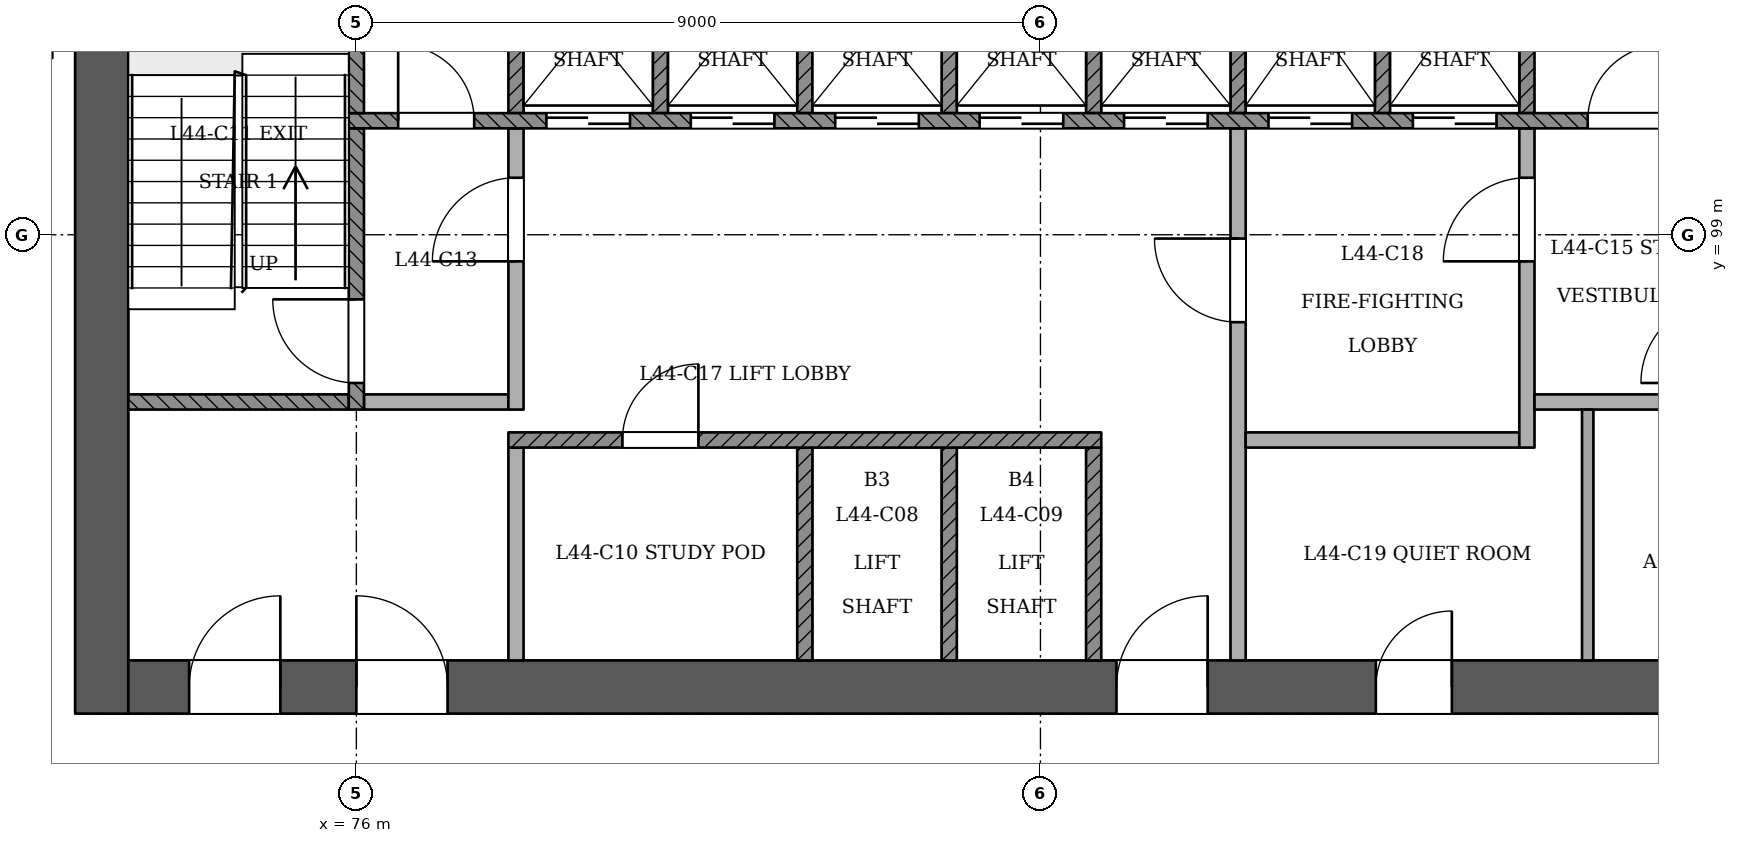
"""IFC4 building model, lengths in metres.
Left out: names, types, materials, properties, quantities, classifications, styles, units other than length and angle.
Written with IfcOpenShell. Run it as: python <this file> out.ifc"""

import sys

from ifc_helpers import new_model, si_unit, direction, frame, frame_2d, origin, place, context, subcontext, project, spatial, rectangle, extrude, element, fill, save


model = new_model("IFC4")
c1 = context("Model", 3, precision=1e-05, world=origin(), true_north=direction((0.0, 1.0)))
c2 = subcontext(c1, "Body", "Model", "MODEL_VIEW")
j1 = project(units=[si_unit("LENGTHUNIT", "METRE"), si_unit("PLANEANGLEUNIT", "RADIAN")], contexts=[c1])
p1 = place(None, origin())
s1 = spatial("IfcSite", under=j1, at=p1, CompositionType="ELEMENT")
p2 = place(p1, origin())
s2 = spatial("IfcBuilding", under=s1, at=p2, CompositionType="ELEMENT")
p3 = place(p2, frame((0.0, 0.0, 171.0)))
s3 = spatial("IfcBuildingStorey", under=s2, at=p3, CompositionType="ELEMENT", Elevation=171.0)
p4 = place(p3, frame((72.65, 93.05, 0.0), z_axis=(0.0, 0.0, 1.0), x_axis=(1.0, 0.0, 0.0)))
e1 = element("IfcWall", 1, at=p4, inside=s3, PredefinedType="SHEAR", context=c2, shape_type="SweptSolid", body=[
    extrude(rectangle(XDim=25.05, YDim=0.7, at=frame_2d((12.525, 0.0))), origin(), (0.0, 0.0, 1.0), 3.6),
])
p5 = place(p4, frame((1.15, 0.0, 0.0)))
e2 = element("IfcOpeningElement", 2, at=p5, cuts=e1, PredefinedType="OPENING", context=c2, shape_type="SweptSolid", body=[
    extrude(rectangle(XDim=1.2, YDim=2.1, at=frame_2d((0.6, 1.05))), frame((0.0, 0.36, 0.0), z_axis=(0.0, -1.0, 0.0), x_axis=(1.0, 0.0, 0.0)), (0.0, 0.0, 1.0), 0.721),
])
p6 = place(p4, frame((3.35, 0.0, 0.0)))
e3 = element("IfcOpeningElement", 3, at=p6, cuts=e1, PredefinedType="OPENING", context=c2, shape_type="SweptSolid", body=[
    extrude(rectangle(XDim=1.2, YDim=2.1, at=frame_2d((0.6, 1.05))), frame((0.0, 0.36, 0.0), z_axis=(0.0, -1.0, 0.0), x_axis=(1.0, 0.0, 0.0)), (0.0, 0.0, 1.0), 0.721),
])
p7 = place(p4, frame((13.35, 0.0, 0.0)))
e4 = element("IfcOpeningElement", 4, at=p7, cuts=e1, PredefinedType="OPENING", context=c2, shape_type="SweptSolid", body=[
    extrude(rectangle(XDim=1.2, YDim=2.1, at=frame_2d((0.6, 1.05))), frame((0.0, 0.36, 0.0), z_axis=(0.0, -1.0, 0.0), x_axis=(1.0, 0.0, 0.0)), (0.0, 0.0, 1.0), 0.721),
])
p8 = place(p4, frame((16.762, 0.0, 0.0)))
e5 = element("IfcOpeningElement", 5, at=p8, cuts=e1, PredefinedType="OPENING", context=c2, shape_type="SweptSolid", body=[
    extrude(rectangle(XDim=1.0, YDim=2.1, at=frame_2d((0.5, 1.05))), frame((0.0, 0.36, 0.0), z_axis=(0.0, -1.0, 0.0), x_axis=(1.0, 0.0, 0.0)), (0.0, 0.0, 1.0), 0.721),
])
p9 = place(p4, frame((20.65, 0.0, 0.0)))
e6 = element("IfcOpeningElement", 6, at=p9, cuts=e1, PredefinedType="OPENING", context=c2, shape_type="SweptSolid", body=[
    extrude(rectangle(XDim=1.0, YDim=2.1, at=frame_2d((0.5, 1.05))), frame((0.0, 0.36, 0.0), z_axis=(0.0, -1.0, 0.0), x_axis=(1.0, 0.0, 0.0)), (0.0, 0.0, 1.0), 0.721),
])
p10 = place(p4, frame((23.087, 0.0, 0.0)))
e7 = element("IfcOpeningElement", 7, at=p10, cuts=e1, PredefinedType="OPENING", context=c2, shape_type="SweptSolid", body=[
    extrude(rectangle(XDim=1.0, YDim=2.1, at=frame_2d((0.5, 1.05))), frame((0.0, 0.36, 0.0), z_axis=(0.0, -1.0, 0.0), x_axis=(1.0, 0.0, 0.0)), (0.0, 0.0, 1.0), 0.721),
])
p11 = place(p3, frame((72.65, 103.75, 0.0), z_axis=(0.0, 0.0, 1.0), x_axis=(0.0, -1.0, 0.0)))
e8 = element("IfcWall", 8, at=p11, inside=s3, PredefinedType="SHEAR", context=c2, shape_type="SweptSolid", body=[
    extrude(rectangle(XDim=11.05, YDim=0.7, at=frame_2d((5.525, 0.0))), origin(), (0.0, 0.0, 1.0), 3.6),
])
p12 = place(p3, frame((78.1, 93.4, 0.0), z_axis=(0.0, 0.0, 1.0), x_axis=(0.0, 1.0, 0.0)))
e9 = element("IfcWall", 9, at=p12, inside=s3, PredefinedType="PARTITIONING", context=c2, shape_type="SweptSolid", body=[
    extrude(rectangle(XDim=2.8, YDim=0.2, at=frame_2d((1.4, 0.0))), origin(), (0.0, 0.0, 1.0), 3.15),
])
for number, where, z_axis, x_axis in (
    (10, (81.9, 93.4, 0.0), (0.0, 0.0, 1.0), (0.0, 1.0, 0.0)),
    (11, (83.8, 93.4, 0.0), (0.0, 0.0, 1.0), (0.0, 1.0, 0.0)),
    (12, (85.7, 93.4, 0.0), (0.0, 0.0, 1.0), (0.0, 1.0, 0.0)),
):
    element("IfcWall", number, at=place(p3, frame(where, z_axis=z_axis, x_axis=x_axis)), inside=s3, PredefinedType="SOLIDWALL", context=c2, shape_type="SweptSolid", body=[
        extrude(rectangle(XDim=2.8, YDim=0.2, at=frame_2d((1.4, 0.0))), origin(), (0.0, 0.0, 1.0), 3.15),
    ])
p13 = place(p3, frame((87.6, 93.4, 0.0), z_axis=(0.0, 0.0, 1.0), x_axis=(0.0, 1.0, 0.0)))
e13 = element("IfcWall", 13, at=p13, inside=s3, PredefinedType="PARTITIONING", context=c2, shape_type="SweptSolid", body=[
    extrude(rectangle(XDim=7.0, YDim=0.2, at=frame_2d((3.5, 0.0))), origin(), (0.0, 0.0, 1.0), 3.15),
])
p14 = place(p13, frame((4.45, 0.0, 0.0)))
e14 = element("IfcOpeningElement", 14, at=p14, cuts=e13, PredefinedType="OPENING", context=c2, shape_type="SweptSolid", body=[
    extrude(rectangle(XDim=1.1, YDim=2.1, at=frame_2d((0.55, 1.05))), frame((0.0, 0.11, 0.0), z_axis=(0.0, -1.0, 0.0), x_axis=(1.0, 0.0, 0.0)), (0.0, 0.0, 1.0), 0.221),
])
p15 = place(p3, frame((92.2, 93.4, 0.0), z_axis=(0.0, 0.0, 1.0), x_axis=(0.0, 1.0, 0.0)))
e15 = element("IfcWall", 15, at=p15, inside=s3, PredefinedType="PARTITIONING", context=c2, shape_type="SweptSolid", body=[
    extrude(rectangle(XDim=3.3, YDim=0.15, at=frame_2d((1.65, 0.0))), origin(), (0.0, 0.0, 1.0), 3.15),
])
p16 = place(p3, frame((78.0, 96.3, 0.0), z_axis=(0.0, 0.0, 1.0), x_axis=(1.0, 0.0, 0.0)))
e16 = element("IfcWall", 16, at=p16, inside=s3, PredefinedType="SOLIDWALL", context=c2, shape_type="SweptSolid", body=[
    extrude(rectangle(XDim=7.8, YDim=0.2, at=frame_2d((3.9, 0.0))), origin(), (0.0, 0.0, 1.0), 3.15),
])
p17 = place(p16, frame((1.5, 0.0, 0.0)))
e17 = element("IfcOpeningElement", 17, at=p17, cuts=e16, PredefinedType="OPENING", context=c2, shape_type="SweptSolid", body=[
    extrude(rectangle(XDim=1.0, YDim=2.1, at=frame_2d((0.5, 1.05))), frame((0.0, 0.11, 0.0), z_axis=(0.0, -1.0, 0.0), x_axis=(1.0, 0.0, 0.0)), (0.0, 0.0, 1.0), 0.221),
])
p18 = place(p3, frame((87.7, 96.3, 0.0), z_axis=(0.0, 0.0, 1.0), x_axis=(1.0, 0.0, 0.0)))
e18 = element("IfcWall", 18, at=p18, inside=s3, PredefinedType="PARTITIONING", context=c2, shape_type="SweptSolid", body=[
    extrude(rectangle(XDim=3.6, YDim=0.2, at=frame_2d((1.8, 0.0))), origin(), (0.0, 0.0, 1.0), 3.15),
])
p19 = place(p3, frame((91.4, 96.2, 0.0), z_axis=(0.0, 0.0, 1.0), x_axis=(0.0, 1.0, 0.0)))
e19 = element("IfcWall", 19, at=p19, inside=s3, PredefinedType="PARTITIONING", context=c2, shape_type="SweptSolid", body=[
    extrude(rectangle(XDim=4.2, YDim=0.2, at=frame_2d((2.1, 0.0))), origin(), (0.0, 0.0, 1.0), 3.15),
])
p20 = place(p19, frame((2.45, 0.0, 0.0)))
e20 = element("IfcOpeningElement", 20, at=p20, cuts=e19, PredefinedType="OPENING", context=c2, shape_type="SweptSolid", body=[
    extrude(rectangle(XDim=1.1, YDim=2.1, at=frame_2d((0.55, 1.05))), frame((0.0, 0.11, 0.0), z_axis=(0.0, -1.0, 0.0), x_axis=(1.0, 0.0, 0.0)), (0.0, 0.0, 1.0), 0.221),
])
p21 = place(p3, frame((73.0, 96.8, 0.0), z_axis=(0.0, 0.0, 1.0), x_axis=(1.0, 0.0, 0.0)))
e21 = element("IfcWall", 21, at=p21, inside=s3, PredefinedType="SOLIDWALL", context=c2, shape_type="SweptSolid", body=[
    extrude(rectangle(XDim=2.9, YDim=0.2, at=frame_2d((1.45, 0.0))), origin(), (0.0, 0.0, 1.0), 3.15),
])
p22 = place(p3, frame((76.0, 96.7, 0.0), z_axis=(0.0, 0.0, 1.0), x_axis=(0.0, 1.0, 0.0)))
e22 = element("IfcWall", 22, at=p22, inside=s3, PredefinedType="SOLIDWALL", context=c2, shape_type="SweptSolid", body=[
    extrude(rectangle(XDim=3.7, YDim=0.2, at=frame_2d((1.85, 0.0))), origin(), (0.0, 0.0, 1.0), 3.15),
])
p23 = place(p22, frame((0.35, 0.0, 0.0)))
e23 = element("IfcOpeningElement", 23, at=p23, cuts=e22, PredefinedType="OPENING", context=c2, shape_type="SweptSolid", body=[
    extrude(rectangle(XDim=1.1, YDim=2.1, at=frame_2d((0.55, 1.05))), frame((0.0, 0.11, 0.0), z_axis=(0.0, -1.0, 0.0), x_axis=(1.0, 0.0, 0.0)), (0.0, 0.0, 1.0), 0.221),
])
p24 = place(p3, frame((76.1, 96.8, 0.0), z_axis=(0.0, 0.0, 1.0), x_axis=(1.0, 0.0, 0.0)))
e24 = element("IfcWall", 24, at=p24, inside=s3, PredefinedType="PARTITIONING", context=c2, shape_type="SweptSolid", body=[
    extrude(rectangle(XDim=1.9, YDim=0.2, at=frame_2d((0.95, 0.0))), origin(), (0.0, 0.0, 1.0), 3.15),
])
p25 = place(p3, frame((78.1, 96.7, 0.0), z_axis=(0.0, 0.0, 1.0), x_axis=(0.0, 1.0, 0.0)))
e25 = element("IfcWall", 25, at=p25, inside=s3, PredefinedType="PARTITIONING", context=c2, shape_type="SweptSolid", body=[
    extrude(rectangle(XDim=3.7, YDim=0.2, at=frame_2d((1.85, 0.0))), origin(), (0.0, 0.0, 1.0), 3.15),
])
p26 = place(p25, frame((1.95, 0.0, 0.0)))
e26 = element("IfcOpeningElement", 26, at=p26, cuts=e25, PredefinedType="OPENING", context=c2, shape_type="SweptSolid", body=[
    extrude(rectangle(XDim=1.1, YDim=2.1, at=frame_2d((0.55, 1.05))), frame((0.0, 0.11, 0.0), z_axis=(0.0, -1.0, 0.0), x_axis=(1.0, 0.0, 0.0)), (0.0, 0.0, 1.0), 0.221),
])
p27 = place(p3, frame((91.5, 96.8, 0.0), z_axis=(0.0, 0.0, 1.0), x_axis=(1.0, 0.0, 0.0)))
e27 = element("IfcWall", 27, at=p27, inside=s3, PredefinedType="PARTITIONING", context=c2, shape_type="SweptSolid", body=[
    extrude(rectangle(XDim=2.4, YDim=0.2, at=frame_2d((1.2, 0.0))), origin(), (0.0, 0.0, 1.0), 3.15),
])
p28 = place(p3, frame((75.9, 100.5, 0.0), z_axis=(0.0, 0.0, 1.0), x_axis=(1.0, 0.0, 0.0)))
e28 = element("IfcWall", 28, at=p28, inside=s3, PredefinedType="SOLIDWALL", context=c2, shape_type="SweptSolid", body=[
    extrude(rectangle(XDim=18.2, YDim=0.2, at=frame_2d((9.1, 0.0))), origin(), (0.0, 0.0, 1.0), 3.15),
])
p29 = place(p28, frame((2.6, 0.0, 0.0)))
e29 = element("IfcOpeningElement", 29, at=p29, cuts=e28, PredefinedType="OPENING", context=c2, shape_type="SweptSolid", body=[
    extrude(rectangle(XDim=1.1, YDim=2.1, at=frame_2d((0.55, 1.05))), frame((0.0, 0.11, 0.0), z_axis=(0.0, -1.0, 0.0), x_axis=(1.0, 0.0, 0.0)), (0.0, 0.0, 1.0), 0.221),
])
p30 = place(p28, frame((4.5, 0.0, 0.0)))
e30 = element("IfcOpeningElement", 30, at=p30, cuts=e28, PredefinedType="OPENING", context=c2, shape_type="SweptSolid", body=[
    extrude(rectangle(XDim=1.1, YDim=2.1, at=frame_2d((0.55, 1.05))), frame((0.0, 0.11, 0.0), z_axis=(0.0, -1.0, 0.0), x_axis=(1.0, 0.0, 0.0)), (0.0, 0.0, 1.0), 0.221),
])
p31 = place(p28, frame((6.4, 0.0, 0.0)))
e31 = element("IfcOpeningElement", 31, at=p31, cuts=e28, PredefinedType="OPENING", context=c2, shape_type="SweptSolid", body=[
    extrude(rectangle(XDim=1.1, YDim=2.1, at=frame_2d((0.55, 1.05))), frame((0.0, 0.11, 0.0), z_axis=(0.0, -1.0, 0.0), x_axis=(1.0, 0.0, 0.0)), (0.0, 0.0, 1.0), 0.221),
])
p32 = place(p28, frame((8.3, 0.0, 0.0)))
e32 = element("IfcOpeningElement", 32, at=p32, cuts=e28, PredefinedType="OPENING", context=c2, shape_type="SweptSolid", body=[
    extrude(rectangle(XDim=1.1, YDim=2.1, at=frame_2d((0.55, 1.05))), frame((0.0, 0.11, 0.0), z_axis=(0.0, -1.0, 0.0), x_axis=(1.0, 0.0, 0.0)), (0.0, 0.0, 1.0), 0.221),
])
p33 = place(p28, frame((10.2, 0.0, 0.0)))
e33 = element("IfcOpeningElement", 33, at=p33, cuts=e28, PredefinedType="OPENING", context=c2, shape_type="SweptSolid", body=[
    extrude(rectangle(XDim=1.1, YDim=2.1, at=frame_2d((0.55, 1.05))), frame((0.0, 0.11, 0.0), z_axis=(0.0, -1.0, 0.0), x_axis=(1.0, 0.0, 0.0)), (0.0, 0.0, 1.0), 0.221),
])
p34 = place(p28, frame((12.1, 0.0, 0.0)))
e34 = element("IfcOpeningElement", 34, at=p34, cuts=e28, PredefinedType="OPENING", context=c2, shape_type="SweptSolid", body=[
    extrude(rectangle(XDim=1.1, YDim=2.1, at=frame_2d((0.55, 1.05))), frame((0.0, 0.11, 0.0), z_axis=(0.0, -1.0, 0.0), x_axis=(1.0, 0.0, 0.0)), (0.0, 0.0, 1.0), 0.221),
])
p35 = place(p28, frame((14.0, 0.0, 0.0)))
e35 = element("IfcOpeningElement", 35, at=p35, cuts=e28, PredefinedType="OPENING", context=c2, shape_type="SweptSolid", body=[
    extrude(rectangle(XDim=1.1, YDim=2.1, at=frame_2d((0.55, 1.05))), frame((0.0, 0.11, 0.0), z_axis=(0.0, -1.0, 0.0), x_axis=(1.0, 0.0, 0.0)), (0.0, 0.0, 1.0), 0.221),
])
p36 = place(p28, frame((0.65, 0.0, 0.0)))
e36 = element("IfcOpeningElement", 36, at=p36, cuts=e28, PredefinedType="OPENING", context=c2, shape_type="SweptSolid", body=[
    extrude(rectangle(XDim=1.0, YDim=2.1, at=frame_2d((0.5, 1.05))), frame((0.0, 0.11, 0.0), z_axis=(0.0, -1.0, 0.0), x_axis=(1.0, 0.0, 0.0)), (0.0, 0.0, 1.0), 0.221),
])
p37 = place(p28, frame((16.3, 0.0, 0.0)))
e37 = element("IfcOpeningElement", 37, at=p37, cuts=e28, PredefinedType="OPENING", context=c2, shape_type="SweptSolid", body=[
    extrude(rectangle(XDim=1.0, YDim=2.1, at=frame_2d((0.5, 1.05))), frame((0.0, 0.11, 0.0), z_axis=(0.0, -1.0, 0.0), x_axis=(1.0, 0.0, 0.0)), (0.0, 0.0, 1.0), 0.221),
])
for number, where, z_axis, x_axis in (
    (38, (76.0, 100.6, 0.0), (0.0, 0.0, 1.0), (0.0, 1.0, 0.0)),
    (39, (78.1, 100.6, 0.0), (0.0, 0.0, 1.0), (0.0, 1.0, 0.0)),
    (40, (80.0, 100.6, 0.0), (0.0, 0.0, 1.0), (0.0, 1.0, 0.0)),
    (41, (81.9, 100.6, 0.0), (0.0, 0.0, 1.0), (0.0, 1.0, 0.0)),
    (42, (83.8, 100.6, 0.0), (0.0, 0.0, 1.0), (0.0, 1.0, 0.0)),
    (43, (85.7, 100.6, 0.0), (0.0, 0.0, 1.0), (0.0, 1.0, 0.0)),
    (44, (87.6, 100.6, 0.0), (0.0, 0.0, 1.0), (0.0, 1.0, 0.0)),
    (45, (89.5, 100.6, 0.0), (0.0, 0.0, 1.0), (0.0, 1.0, 0.0)),
    (46, (91.4, 100.6, 0.0), (0.0, 0.0, 1.0), (0.0, 1.0, 0.0)),
):
    element("IfcWall", number, at=place(p3, frame(where, z_axis=z_axis, x_axis=x_axis)), inside=s3, PredefinedType="SOLIDWALL", context=c2, shape_type="SweptSolid", body=[
        extrude(rectangle(XDim=2.8, YDim=0.2, at=frame_2d((1.4, 0.0))), origin(), (0.0, 0.0, 1.0), 3.15),
    ])
p38 = place(p29, origin())
e47 = element("IfcDoor", 47, at=p38, inside=s3, OperationType="SLIDING_TO_RIGHT", PredefinedType="NOTDEFINED", context=c2, shape_type="SweptSolid", body=[
    extrude(rectangle(XDim=1.1, YDim=2.1, at=frame_2d((0.55, 1.05))), frame((0.0, 0.025, 0.0), z_axis=(0.0, -1.0, 0.0), x_axis=(1.0, 0.0, 0.0)), (0.0, 0.0, 1.0), 0.05),
])
fill(e29, e47)
p39 = place(p30, origin())
e48 = element("IfcDoor", 48, at=p39, inside=s3, OperationType="SLIDING_TO_LEFT", PredefinedType="NOTDEFINED", context=c2, shape_type="SweptSolid", body=[
    extrude(rectangle(XDim=1.1, YDim=2.1, at=frame_2d((0.55, 1.05))), frame((0.0, 0.025, 0.0), z_axis=(0.0, -1.0, 0.0), x_axis=(1.0, 0.0, 0.0)), (0.0, 0.0, 1.0), 0.05),
])
fill(e30, e48)
p40 = place(p31, origin())
e49 = element("IfcDoor", 49, at=p40, inside=s3, OperationType="SLIDING_TO_RIGHT", PredefinedType="NOTDEFINED", context=c2, shape_type="SweptSolid", body=[
    extrude(rectangle(XDim=1.1, YDim=2.1, at=frame_2d((0.55, 1.05))), frame((0.0, 0.025, 0.0), z_axis=(0.0, -1.0, 0.0), x_axis=(1.0, 0.0, 0.0)), (0.0, 0.0, 1.0), 0.05),
])
fill(e31, e49)
p41 = place(p32, origin())
e50 = element("IfcDoor", 50, at=p41, inside=s3, OperationType="SLIDING_TO_LEFT", PredefinedType="NOTDEFINED", context=c2, shape_type="SweptSolid", body=[
    extrude(rectangle(XDim=1.1, YDim=2.1, at=frame_2d((0.55, 1.05))), frame((0.0, 0.025, 0.0), z_axis=(0.0, -1.0, 0.0), x_axis=(1.0, 0.0, 0.0)), (0.0, 0.0, 1.0), 0.05),
])
fill(e32, e50)
p42 = place(p33, origin())
e51 = element("IfcDoor", 51, at=p42, inside=s3, OperationType="SLIDING_TO_RIGHT", PredefinedType="NOTDEFINED", context=c2, shape_type="SweptSolid", body=[
    extrude(rectangle(XDim=1.1, YDim=2.1, at=frame_2d((0.55, 1.05))), frame((0.0, 0.025, 0.0), z_axis=(0.0, -1.0, 0.0), x_axis=(1.0, 0.0, 0.0)), (0.0, 0.0, 1.0), 0.05),
])
fill(e33, e51)
p43 = place(p34, origin())
e52 = element("IfcDoor", 52, at=p43, inside=s3, OperationType="SLIDING_TO_RIGHT", PredefinedType="NOTDEFINED", context=c2, shape_type="SweptSolid", body=[
    extrude(rectangle(XDim=1.1, YDim=2.1, at=frame_2d((0.55, 1.05))), frame((0.0, 0.025, 0.0), z_axis=(0.0, -1.0, 0.0), x_axis=(1.0, 0.0, 0.0)), (0.0, 0.0, 1.0), 0.05),
])
fill(e34, e52)
p44 = place(p35, origin())
e53 = element("IfcDoor", 53, at=p44, inside=s3, OperationType="SLIDING_TO_LEFT", PredefinedType="NOTDEFINED", context=c2, shape_type="SweptSolid", body=[
    extrude(rectangle(XDim=1.1, YDim=2.1, at=frame_2d((0.55, 1.05))), frame((0.0, 0.025, 0.0), z_axis=(0.0, -1.0, 0.0), x_axis=(1.0, 0.0, 0.0)), (0.0, 0.0, 1.0), 0.05),
])
fill(e35, e53)
p45 = place(p23, origin())
e54 = element("IfcDoor", 54, at=p45, inside=s3, OperationType="SINGLE_SWING_RIGHT", PredefinedType="NOTDEFINED", context=c2, shape_type="SweptSolid", body=[
    extrude(rectangle(XDim=1.1, YDim=2.1, at=frame_2d((0.55, 1.05))), frame((0.0, 0.025, 0.0), z_axis=(0.0, -1.0, 0.0), x_axis=(1.0, 0.0, 0.0)), (0.0, 0.0, 1.0), 0.05),
])
fill(e23, e54)
p46 = place(p26, origin())
e55 = element("IfcDoor", 55, at=p46, inside=s3, OperationType="SINGLE_SWING_LEFT", PredefinedType="NOTDEFINED", context=c2, shape_type="SweptSolid", body=[
    extrude(rectangle(XDim=1.1, YDim=2.1, at=frame_2d((0.55, 1.05))), frame((0.0, 0.025, 0.0), z_axis=(0.0, -1.0, 0.0), x_axis=(1.0, 0.0, 0.0)), (0.0, 0.0, 1.0), 0.05),
])
fill(e26, e55)
p47 = place(p14, origin())
e56 = element("IfcDoor", 56, at=p47, inside=s3, OperationType="SINGLE_SWING_RIGHT", PredefinedType="NOTDEFINED", context=c2, shape_type="SweptSolid", body=[
    extrude(rectangle(XDim=1.1, YDim=2.1, at=frame_2d((0.55, 1.05))), frame((0.0, 0.025, 0.0), z_axis=(0.0, -1.0, 0.0), x_axis=(1.0, 0.0, 0.0)), (0.0, 0.0, 1.0), 0.05),
])
fill(e14, e56)
p48 = place(p20, origin())
e57 = element("IfcDoor", 57, at=p48, inside=s3, OperationType="SINGLE_SWING_LEFT", PredefinedType="NOTDEFINED", context=c2, shape_type="SweptSolid", body=[
    extrude(rectangle(XDim=1.1, YDim=2.1, at=frame_2d((0.55, 1.05))), frame((0.0, 0.025, 0.0), z_axis=(0.0, -1.0, 0.0), x_axis=(1.0, 0.0, 0.0)), (0.0, 0.0, 1.0), 0.05),
])
fill(e20, e57)
p49 = place(p5, origin())
e58 = element("IfcDoor", 58, at=p49, inside=s3, OperationType="SINGLE_SWING_RIGHT", PredefinedType="NOTDEFINED", context=c2, shape_type="SweptSolid", body=[
    extrude(rectangle(XDim=1.2, YDim=2.1, at=frame_2d((0.6, 1.05))), frame((0.0, 0.025, 0.0), z_axis=(0.0, -1.0, 0.0), x_axis=(1.0, 0.0, 0.0)), (0.0, 0.0, 1.0), 0.05),
])
fill(e2, e58)
p50 = place(p6, origin())
e59 = element("IfcDoor", 59, at=p50, inside=s3, OperationType="SINGLE_SWING_LEFT", PredefinedType="NOTDEFINED", context=c2, shape_type="SweptSolid", body=[
    extrude(rectangle(XDim=1.2, YDim=2.1, at=frame_2d((0.6, 1.05))), frame((0.0, 0.025, 0.0), z_axis=(0.0, -1.0, 0.0), x_axis=(1.0, 0.0, 0.0)), (0.0, 0.0, 1.0), 0.05),
])
fill(e3, e59)
p51 = place(p7, origin())
e60 = element("IfcDoor", 60, at=p51, inside=s3, OperationType="SINGLE_SWING_RIGHT", PredefinedType="NOTDEFINED", context=c2, shape_type="SweptSolid", body=[
    extrude(rectangle(XDim=1.2, YDim=2.1, at=frame_2d((0.6, 1.05))), frame((0.0, 0.025, 0.0), z_axis=(0.0, -1.0, 0.0), x_axis=(1.0, 0.0, 0.0)), (0.0, 0.0, 1.0), 0.05),
])
fill(e4, e60)
p52 = place(p36, origin())
e61 = element("IfcDoor", 61, at=p52, inside=s3, OperationType="SINGLE_SWING_LEFT", PredefinedType="NOTDEFINED", context=c2, shape_type="SweptSolid", body=[
    extrude(rectangle(XDim=1.0, YDim=2.1, at=frame_2d((0.5, 1.05))), frame((0.0, 0.025, 0.0), z_axis=(0.0, -1.0, 0.0), x_axis=(1.0, 0.0, 0.0)), (0.0, 0.0, 1.0), 0.05),
])
fill(e36, e61)
p53 = place(p37, origin())
e62 = element("IfcDoor", 62, at=p53, inside=s3, OperationType="SINGLE_SWING_RIGHT", PredefinedType="NOTDEFINED", context=c2, shape_type="SweptSolid", body=[
    extrude(rectangle(XDim=1.0, YDim=2.1, at=frame_2d((0.5, 1.05))), frame((0.0, 0.025, 0.0), z_axis=(0.0, -1.0, 0.0), x_axis=(1.0, 0.0, 0.0)), (0.0, 0.0, 1.0), 0.05),
])
fill(e37, e62)
p54 = place(p8, origin())
e63 = element("IfcDoor", 63, at=p54, inside=s3, OperationType="SINGLE_SWING_RIGHT", PredefinedType="NOTDEFINED", context=c2, shape_type="SweptSolid", body=[
    extrude(rectangle(XDim=1.0, YDim=2.1, at=frame_2d((0.5, 1.05))), frame((0.0, 0.025, 0.0), z_axis=(0.0, -1.0, 0.0), x_axis=(1.0, 0.0, 0.0)), (0.0, 0.0, 1.0), 0.05),
])
fill(e5, e63)
p55 = place(p17, origin())
e64 = element("IfcDoor", 64, at=p55, inside=s3, OperationType="SINGLE_SWING_RIGHT", PredefinedType="NOTDEFINED", context=c2, shape_type="SweptSolid", body=[
    extrude(rectangle(XDim=1.0, YDim=2.1, at=frame_2d((0.5, 1.05))), frame((0.0, 0.025, 0.0), z_axis=(0.0, -1.0, 0.0), x_axis=(1.0, 0.0, 0.0)), (0.0, 0.0, 1.0), 0.05),
])
fill(e17, e64)
save(model, sys.argv[1])
